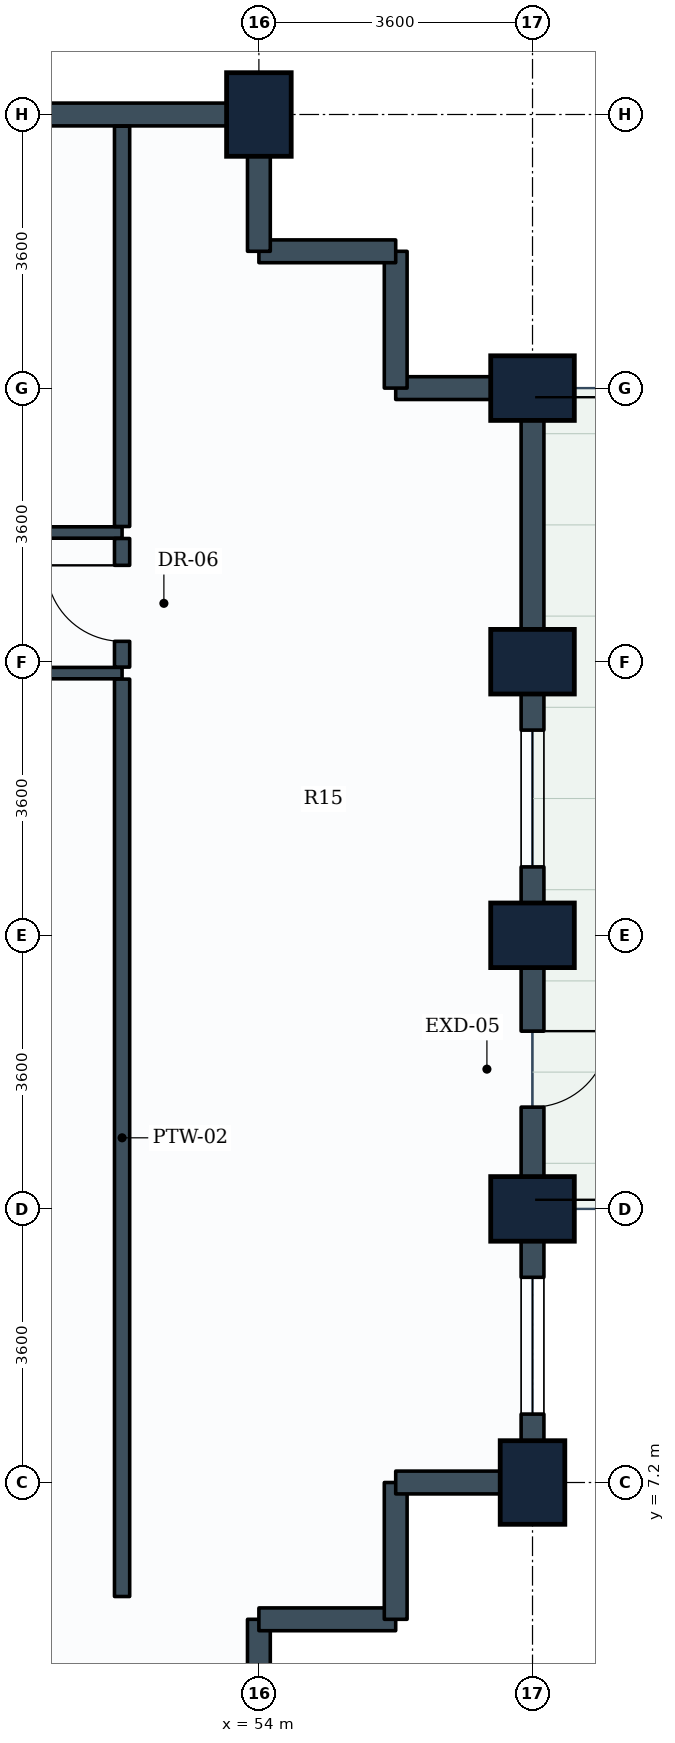
"""IFC4 building model, lengths in metres.
Left out: names, types, materials, properties, quantities, classifications, styles, units other than length and angle.
Written with IfcOpenShell. Run it as: python <this file> out.ifc"""

import sys

from ifc_helpers import new_model, si_unit, direction, frame, frame_2d, origin, origin_2d, place, context, subcontext, project, spatial, rectangle, extrude, element, fill, save


model = new_model("IFC4")
c1 = context("Model", 3, precision=1e-05, world=origin(), true_north=direction((0.0, 1.0)))
c2 = subcontext(c1, "Body", "Model", "MODEL_VIEW")
j1 = project(units=[si_unit("LENGTHUNIT", "METRE"), si_unit("PLANEANGLEUNIT", "RADIAN")], contexts=[c1])
p1 = place(None, origin())
s1 = spatial("IfcSite", under=j1, at=p1, CompositionType="ELEMENT")
p2 = place(p1, origin())
s2 = spatial("IfcBuilding", under=s1, at=p2, CompositionType="ELEMENT")
p3 = place(p2, frame((0.0, 0.0, 103.5)))
s3 = spatial("IfcBuildingStorey", under=s2, at=p3, CompositionType="ELEMENT", Elevation=103.5)
for number, where, z_axis, x_axis in (
    (1, (54.0, 25.2, 0.0), (0.0, 0.0, 1.0), (1.0, 0.0, 0.0)),
    (2, (57.6, 7.2, 0.0), (0.0, 0.0, 1.0), (1.0, 0.0, 0.0)),
    (3, (57.6, 10.8, 0.0), (0.0, 0.0, 1.0), (0.0, 1.0, 0.0)),
    (4, (57.6, 14.4, 0.0), (0.0, 0.0, 1.0), (0.0, 1.0, 0.0)),
    (5, (57.6, 18.0, 0.0), (0.0, 0.0, 1.0), (0.0, 1.0, 0.0)),
    (6, (57.6, 21.6, 0.0), (0.0, 0.0, 1.0), (0.0, 1.0, 0.0)),
):
    element("IfcColumn", number, at=place(p3, frame(where, z_axis=z_axis, x_axis=x_axis)), inside=s3, PredefinedType="COLUMN", context=c2, shape_type="SweptSolid", body=[
        extrude(rectangle(XDim=0.85, YDim=1.1, at=origin_2d()), origin(), (0.0, 0.0, 1.0), 3.9),
    ])
p4 = place(p3, frame((54.0, 5.4, 0.0), z_axis=(0.0, 0.0, 1.0), x_axis=(0.0, -1.0, 0.0)))
e7 = element("IfcWall", 7, at=p4, inside=s3, PredefinedType="STANDARD", context=c2, shape_type="SweptSolid", body=[
    extrude(rectangle(XDim=1.8, YDim=0.3, at=frame_2d((0.9, 0.0))), origin(), (0.0, 0.0, 1.0), 2.93),
])
for number, where, z_axis, x_axis in (
    (8, (55.8, 5.4, 0.0), (0.0, 0.0, 1.0), (-1.0, 0.0, 0.0)),
    (9, (55.8, 7.2, 0.0), (0.0, 0.0, 1.0), (0.0, -1.0, 0.0)),
):
    element("IfcWall", number, at=place(p3, frame(where, z_axis=z_axis, x_axis=x_axis)), inside=s3, PredefinedType="STANDARD", context=c2, shape_type="SweptSolid", body=[
        extrude(rectangle(XDim=1.8, YDim=0.3, at=frame_2d((0.9, 0.0))), origin(), (0.0, 0.0, 1.0), 3.635),
    ])
p5 = place(p3, frame((57.6, 7.2, 0.0), z_axis=(0.0, 0.0, 1.0), x_axis=(-1.0, 0.0, 0.0)))
e10 = element("IfcWall", 10, at=p5, inside=s3, PredefinedType="STANDARD", context=c2, shape_type="SweptSolid", body=[
    extrude(rectangle(XDim=1.8, YDim=0.3, at=frame_2d((0.9, 0.0))), origin(), (0.0, 0.0, 1.0), 2.93),
])
p6 = place(p3, frame((57.6, 10.8, 0.0), z_axis=(0.0, 0.0, 1.0), x_axis=(0.0, -1.0, 0.0)))
e11 = element("IfcWall", 11, at=p6, inside=s3, PredefinedType="STANDARD", context=c2, shape_type="SweptSolid", body=[
    extrude(rectangle(XDim=3.6, YDim=0.3, at=frame_2d((1.8, 0.0))), origin(), (0.0, 0.0, 1.0), 2.93),
])
p7 = place(p6, frame((0.9, 0.0, 0.85)))
e12 = element("IfcOpeningElement", 12, at=p7, cuts=e11, PredefinedType="OPENING", context=c2, shape_type="SweptSolid", body=[
    extrude(rectangle(XDim=1.8, YDim=1.35, at=frame_2d((0.9, 0.675))), frame((0.0, 0.16, 0.0), z_axis=(0.0, -1.0, 0.0), x_axis=(1.0, 0.0, 0.0)), (0.0, 0.0, 1.0), 0.32),
])
p8 = place(p3, frame((57.6, 14.4, 0.0), z_axis=(0.0, 0.0, 1.0), x_axis=(0.0, -1.0, 0.0)))
e13 = element("IfcWall", 13, at=p8, inside=s3, PredefinedType="STANDARD", context=c2, shape_type="SweptSolid", body=[
    extrude(rectangle(XDim=3.6, YDim=0.3, at=frame_2d((1.8, 0.0))), origin(), (0.0, 0.0, 1.0), 2.93),
])
p9 = place(p8, frame((1.261, 0.0, 0.0)))
e14 = element("IfcOpeningElement", 14, at=p9, cuts=e13, PredefinedType="OPENING", context=c2, shape_type="SweptSolid", body=[
    extrude(rectangle(XDim=1.0, YDim=2.1, at=frame_2d((0.5, 1.05))), frame((0.0, 0.16, 0.0), z_axis=(0.0, -1.0, 0.0), x_axis=(1.0, 0.0, 0.0)), (0.0, 0.0, 1.0), 0.32),
])
p10 = place(p3, frame((57.6, 18.0, 0.0), z_axis=(0.0, 0.0, 1.0), x_axis=(0.0, -1.0, 0.0)))
e15 = element("IfcWall", 15, at=p10, inside=s3, PredefinedType="STANDARD", context=c2, shape_type="SweptSolid", body=[
    extrude(rectangle(XDim=3.6, YDim=0.3, at=frame_2d((1.8, 0.0))), origin(), (0.0, 0.0, 1.0), 2.93),
])
p11 = place(p10, frame((0.9, 0.0, 0.85)))
e16 = element("IfcOpeningElement", 16, at=p11, cuts=e15, PredefinedType="OPENING", context=c2, shape_type="SweptSolid", body=[
    extrude(rectangle(XDim=1.8, YDim=1.35, at=frame_2d((0.9, 0.675))), frame((0.0, 0.16, 0.0), z_axis=(0.0, -1.0, 0.0), x_axis=(1.0, 0.0, 0.0)), (0.0, 0.0, 1.0), 0.32),
])
p12 = place(p3, frame((57.6, 21.6, 0.0), z_axis=(0.0, 0.0, 1.0), x_axis=(0.0, -1.0, 0.0)))
e17 = element("IfcWall", 17, at=p12, inside=s3, PredefinedType="STANDARD", context=c2, shape_type="SweptSolid", body=[
    extrude(rectangle(XDim=3.6, YDim=0.3, at=frame_2d((1.8, 0.0))), origin(), (0.0, 0.0, 1.0), 2.93),
])
p13 = place(p3, frame((55.8, 21.6, 0.0), z_axis=(0.0, 0.0, 1.0), x_axis=(1.0, 0.0, 0.0)))
e18 = element("IfcWall", 18, at=p13, inside=s3, PredefinedType="STANDARD", context=c2, shape_type="SweptSolid", body=[
    extrude(rectangle(XDim=1.8, YDim=0.3, at=frame_2d((0.9, 0.0))), origin(), (0.0, 0.0, 1.0), 2.93),
])
p14 = place(p3, frame((55.8, 23.4, 0.0), z_axis=(0.0, 0.0, 1.0), x_axis=(0.0, -1.0, 0.0)))
e19 = element("IfcWall", 19, at=p14, inside=s3, PredefinedType="STANDARD", context=c2, shape_type="SweptSolid", body=[
    extrude(rectangle(XDim=1.8, YDim=0.3, at=frame_2d((0.9, 0.0))), origin(), (0.0, 0.0, 1.0), 3.635),
])
p15 = place(p3, frame((54.0, 23.4, 0.0), z_axis=(0.0, 0.0, 1.0), x_axis=(1.0, 0.0, 0.0)))
e20 = element("IfcWall", 20, at=p15, inside=s3, PredefinedType="STANDARD", context=c2, shape_type="SweptSolid", body=[
    extrude(rectangle(XDim=1.8, YDim=0.3, at=frame_2d((0.9, 0.0))), origin(), (0.0, 0.0, 1.0), 3.635),
])
p16 = place(p3, frame((54.0, 25.2, 0.0), z_axis=(0.0, 0.0, 1.0), x_axis=(0.0, -1.0, 0.0)))
e21 = element("IfcWall", 21, at=p16, inside=s3, PredefinedType="STANDARD", context=c2, shape_type="SweptSolid", body=[
    extrude(rectangle(XDim=1.8, YDim=0.3, at=frame_2d((0.9, 0.0))), origin(), (0.0, 0.0, 1.0), 2.93),
])
p17 = place(p3, frame((50.4, 25.2, 0.0), z_axis=(0.0, 0.0, 1.0), x_axis=(1.0, 0.0, 0.0)))
e22 = element("IfcWall", 22, at=p17, inside=s3, PredefinedType="STANDARD", context=c2, shape_type="SweptSolid", body=[
    extrude(rectangle(XDim=3.6, YDim=0.3, at=frame_2d((1.8, 0.0))), origin(), (0.0, 0.0, 1.0), 2.93),
])
p18 = place(p3, frame((41.429, 17.85, 0.0), z_axis=(0.0, 0.0, 1.0), x_axis=(1.0, 0.0, 0.0)))
e23 = element("IfcWall", 23, at=p18, inside=s3, PredefinedType="PARTITIONING", context=c2, shape_type="SweptSolid", body=[
    extrude(rectangle(XDim=10.771, YDim=0.15, at=frame_2d((5.385, 0.0))), origin(), (0.0, 0.0, 1.0), 3.18),
])
p19 = place(p18, frame((4.806, 0.0, 0.0)))
e24 = element("IfcOpeningElement", 24, at=p19, cuts=e23, PredefinedType="OPENING", context=c2, shape_type="SweptSolid", body=[
    extrude(rectangle(XDim=1.0, YDim=2.1, at=frame_2d((0.5, 1.05))), frame((0.0, 0.085, 0.0), z_axis=(0.0, -1.0, 0.0), x_axis=(1.0, 0.0, 0.0)), (0.0, 0.0, 1.0), 0.17),
])
p20 = place(p3, frame((45.679, 19.7, 0.0), z_axis=(0.0, 0.0, 1.0), x_axis=(1.0, 0.0, 0.0)))
e25 = element("IfcWall", 25, at=p20, inside=s3, PredefinedType="PARTITIONING", context=c2, shape_type="SweptSolid", body=[
    extrude(rectangle(XDim=6.521, YDim=0.15, at=frame_2d((3.26, 0.0))), origin(), (0.0, 0.0, 1.0), 3.19),
])
p21 = place(p20, frame((2.721, 0.0, 0.0)))
e26 = element("IfcOpeningElement", 26, at=p21, cuts=e25, PredefinedType="OPENING", context=c2, shape_type="SweptSolid", body=[
    extrude(rectangle(XDim=1.0, YDim=2.1, at=frame_2d((0.5, 1.05))), frame((0.0, 0.085, 0.0), z_axis=(0.0, -1.0, 0.0), x_axis=(1.0, 0.0, 0.0)), (0.0, 0.0, 1.0), 0.17),
])
p22 = place(p3, frame((52.2, 5.7, 0.0), z_axis=(0.0, 0.0, 1.0), x_axis=(0.0, 1.0, 0.0)))
e27 = element("IfcWall", 27, at=p22, inside=s3, PredefinedType="PARTITIONING", context=c2, shape_type="SweptSolid", body=[
    extrude(rectangle(XDim=12.071, YDim=0.2, at=frame_2d((6.036, 0.0))), origin(), (0.0, 0.0, 1.0), 3.18),
])
p23 = place(p3, frame((52.2, 19.779, 0.0), z_axis=(0.0, 0.0, 1.0), x_axis=(0.0, 1.0, 0.0)))
e28 = element("IfcWall", 28, at=p23, inside=s3, PredefinedType="PARTITIONING", context=c2, shape_type="SweptSolid", body=[
    extrude(rectangle(XDim=5.267, YDim=0.2, at=frame_2d((2.633, 0.0))), origin(), (0.0, 0.0, 1.0), 2.93),
])
p24 = place(p3, frame((52.2, 17.929, 0.0), z_axis=(0.0, 0.0, 1.0), x_axis=(0.0, 1.0, 0.0)))
e29 = element("IfcWall", 29, at=p24, inside=s3, PredefinedType="PARTITIONING", context=c2, shape_type="SweptSolid", body=[
    extrude(rectangle(XDim=1.692, YDim=0.2, at=frame_2d((0.846, 0.0))), origin(), (0.0, 0.0, 1.0), 3.635),
])
p25 = place(p24, frame((0.339, 0.0, 0.0)))
e30 = element("IfcOpeningElement", 30, at=p25, cuts=e29, PredefinedType="OPENING", context=c2, shape_type="SweptSolid", body=[
    extrude(rectangle(XDim=1.0, YDim=2.1, at=frame_2d((0.5, 1.05))), frame((0.0, 0.11, 0.0), z_axis=(0.0, -1.0, 0.0), x_axis=(1.0, 0.0, 0.0)), (0.0, 0.0, 1.0), 0.22),
])
p26 = place(p7, origin())
e31 = element("IfcWindow", 31, at=p26, inside=s3, PartitioningType="SINGLE_PANEL", PredefinedType="WINDOW", context=c2, shape_type="SweptSolid", body=[
    extrude(rectangle(XDim=1.8, YDim=1.35, at=frame_2d((0.9, 0.675))), frame((0.0, 0.03, 0.0), z_axis=(0.0, -1.0, 0.0), x_axis=(1.0, 0.0, 0.0)), (0.0, 0.0, 1.0), 0.06),
])
fill(e12, e31)
p27 = place(p9, origin())
e32 = element("IfcDoor", 32, at=p27, inside=s3, OperationType="SINGLE_SWING_LEFT", PredefinedType="DOOR", context=c2, shape_type="SweptSolid", body=[
    extrude(rectangle(XDim=1.0, YDim=2.1, at=frame_2d((0.5, 1.05))), frame((0.0, 0.025, 0.0), z_axis=(0.0, -1.0, 0.0), x_axis=(1.0, 0.0, 0.0)), (0.0, 0.0, 1.0), 0.05),
])
fill(e14, e32)
p28 = place(p11, origin())
e33 = element("IfcWindow", 33, at=p28, inside=s3, PartitioningType="SINGLE_PANEL", PredefinedType="WINDOW", context=c2, shape_type="SweptSolid", body=[
    extrude(rectangle(XDim=1.8, YDim=1.35, at=frame_2d((0.9, 0.675))), frame((0.0, 0.03, 0.0), z_axis=(0.0, -1.0, 0.0), x_axis=(1.0, 0.0, 0.0)), (0.0, 0.0, 1.0), 0.06),
])
fill(e16, e33)
p29 = place(p25, origin())
e34 = element("IfcDoor", 34, at=p29, inside=s3, OperationType="SINGLE_SWING_RIGHT", PredefinedType="DOOR", context=c2, shape_type="SweptSolid", body=[
    extrude(rectangle(XDim=1.0, YDim=2.1, at=frame_2d((0.5, 1.05))), frame((0.0, 0.025, 0.0), z_axis=(0.0, -1.0, 0.0), x_axis=(1.0, 0.0, 0.0)), (0.0, 0.0, 1.0), 0.05),
])
fill(e30, e34)
save(model, sys.argv[1])
